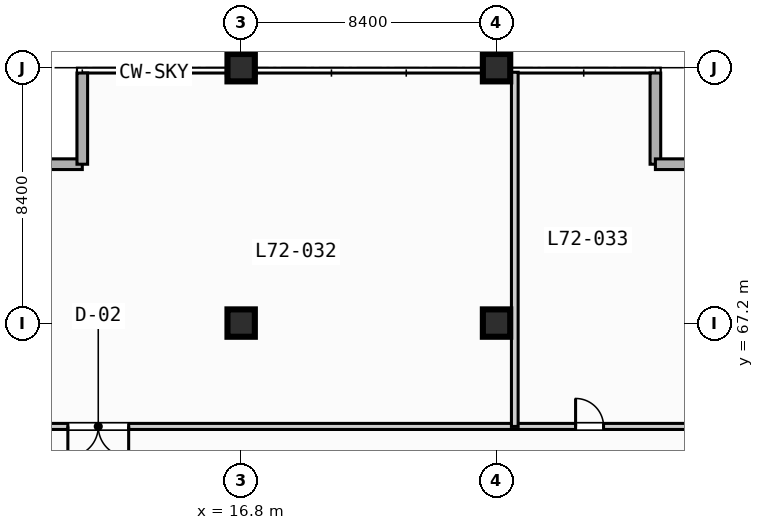
"""IFC4 building model, lengths in metres.
Left out: names, types, materials, properties, quantities, classifications, styles, units other than length and angle.
Written with IfcOpenShell. Run it as: python <this file> out.ifc"""

import sys

from ifc_helpers import new_model, si_unit, direction, frame, frame_2d, origin, origin_2d, place, context, subcontext, project, spatial, rectangle, extrude, element, fill, save


model = new_model("IFC4")
c1 = context("Model", 3, precision=1e-05, world=origin(), true_north=direction((0.0, 1.0)))
c2 = subcontext(c1, "Body", "Model", "MODEL_VIEW")
j1 = project(units=[si_unit("LENGTHUNIT", "METRE"), si_unit("PLANEANGLEUNIT", "RADIAN")], contexts=[c1])
p1 = place(None, origin())
s1 = spatial("IfcSite", under=j1, at=p1, CompositionType="ELEMENT")
p2 = place(p1, origin())
s2 = spatial("IfcBuilding", under=s1, at=p2, CompositionType="ELEMENT")
p3 = place(p2, frame((0.0, 0.0, 290.4)))
s3 = spatial("IfcBuildingStorey", under=s2, at=p3, CompositionType="ELEMENT", Elevation=290.4)
for number, where, z_axis, x_axis in (
    (1, (16.8, 67.2, 0.0), (0.0, 0.0, 1.0), (1.0, 0.0, 0.0)),
    (2, (16.8, 75.6, 0.0), (0.0, 0.0, 1.0), (1.0, 0.0, 0.0)),
    (3, (25.2, 67.2, 0.0), (0.0, 0.0, 1.0), (1.0, 0.0, 0.0)),
    (4, (25.2, 75.6, 0.0), (0.0, 0.0, 1.0), (1.0, 0.0, 0.0)),
):
    element("IfcColumn", number, at=place(p3, frame(where, z_axis=z_axis, x_axis=x_axis)), inside=s3, PredefinedType="COLUMN", context=c2, shape_type="SweptSolid", body=[
        extrude(rectangle(XDim=0.9, YDim=0.9, at=origin_2d()), origin(), (0.0, 0.0, 1.0), 4.4),
    ])
for number, where, z_axis, x_axis in (
    (5, (8.575, 72.425, 0.0), (0.0, 0.0, 1.0), (1.0, 0.0, 0.0)),
    (6, (11.575, 72.425, 0.0), (0.0, 0.0, 1.0), (0.0, 1.0, 0.0)),
    (7, (30.425, 75.425, 0.0), (0.0, 0.0, 1.0), (0.0, -1.0, 0.0)),
    (8, (30.425, 72.425, 0.0), (0.0, 0.0, 1.0), (1.0, 0.0, 0.0)),
):
    element("IfcWall", number, at=place(p3, frame(where, z_axis=z_axis, x_axis=x_axis)), inside=s3, PredefinedType="STANDARD", context=c2, shape_type="SweptSolid", body=[
        extrude(rectangle(XDim=3.0, YDim=0.35, at=frame_2d((1.5, 0.0))), origin(), (0.0, 0.0, 1.0), 4.05),
    ])
p4 = place(p3, frame((8.7, 63.8, 0.0), z_axis=(0.0, 0.0, 1.0), x_axis=(1.0, 0.0, 0.0)))
e9 = element("IfcWall", 9, at=p4, inside=s3, PredefinedType="PARTITIONING", context=c2, shape_type="SweptSolid", body=[
    extrude(rectangle(XDim=24.6, YDim=0.2, at=frame_2d((12.3, 0.0))), origin(), (0.0, 0.0, 1.0), 4.05),
])
p5 = place(p4, frame((2.4, 0.0, 0.0)))
e10 = element("IfcOpeningElement", 10, at=p5, cuts=e9, PredefinedType="OPENING", context=c2, shape_type="SweptSolid", body=[
    extrude(rectangle(XDim=2.0, YDim=2.15, at=frame_2d((1.0, 1.075))), frame((0.0, 0.11, 0.0), z_axis=(0.0, -1.0, 0.0), x_axis=(1.0, 0.0, 0.0)), (0.0, 0.0, 1.0), 0.22),
])
p6 = place(p4, frame((19.1, 0.0, 0.0)))
e11 = element("IfcOpeningElement", 11, at=p6, cuts=e9, PredefinedType="OPENING", context=c2, shape_type="SweptSolid", body=[
    extrude(rectangle(XDim=0.92, YDim=2.1, at=frame_2d((0.46, 1.05))), frame((0.0, 0.11, 0.0), z_axis=(0.0, -1.0, 0.0), x_axis=(1.0, 0.0, 0.0)), (0.0, 0.0, 1.0), 0.22),
])
p7 = place(p3, frame((25.8, 63.8, 0.0), z_axis=(0.0, 0.0, 1.0), x_axis=(0.0, 1.0, 0.0)))
e12 = element("IfcWall", 12, at=p7, inside=s3, PredefinedType="PARTITIONING", context=c2, shape_type="SweptSolid", body=[
    extrude(rectangle(XDim=11.65, YDim=0.22, at=frame_2d((5.825, 0.0))), origin(), (0.0, 0.0, 1.0), 4.05),
])
p8 = place(p5, origin())
e13 = element("IfcDoor", 13, at=p8, inside=s3, OperationType="SINGLE_SWING_RIGHT", PredefinedType="DOOR", context=c2, shape_type="SweptSolid", body=[
    extrude(rectangle(XDim=2.0, YDim=2.15, at=frame_2d((1.0, 1.075))), frame((0.0, 0.025, 0.0), z_axis=(0.0, -1.0, 0.0), x_axis=(1.0, 0.0, 0.0)), (0.0, 0.0, 1.0), 0.05),
])
fill(e10, e13)
p9 = place(p6, origin())
e14 = element("IfcDoor", 14, at=p9, inside=s3, OperationType="SINGLE_SWING_LEFT", PredefinedType="DOOR", context=c2, shape_type="SweptSolid", body=[
    extrude(rectangle(XDim=0.92, YDim=2.1, at=frame_2d((0.46, 1.05))), frame((0.0, 0.025, 0.0), z_axis=(0.0, -1.0, 0.0), x_axis=(1.0, 0.0, 0.0)), (0.0, 0.0, 1.0), 0.05),
])
fill(e11, e14)
save(model, sys.argv[1])
